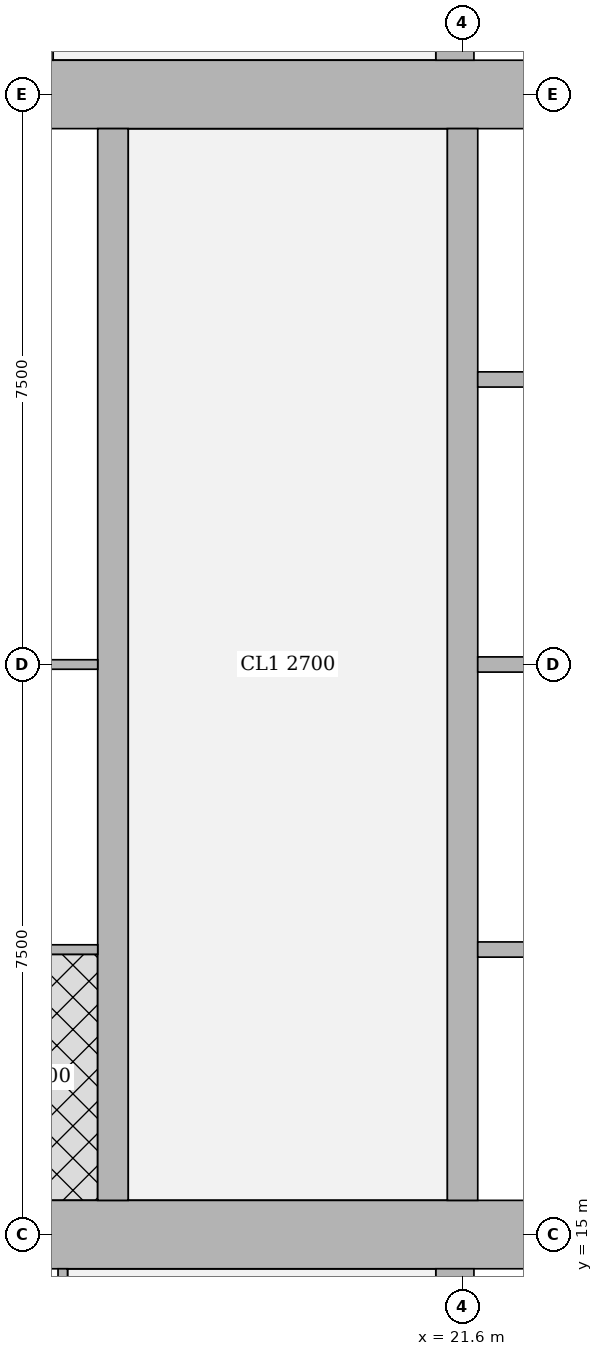
"""IFC4 building model, lengths in metres.
Left out: names, types, materials, properties, quantities, classifications, styles, units other than length and angle.
Written with IfcOpenShell. Run it as: python <this file> out.ifc"""

import sys

from ifc_helpers import new_model, si_unit, direction, frame, frame_2d, origin, place, context, subcontext, project, spatial, rectangle, extrude, element, fill, save


model = new_model("IFC4")
c1 = context("Model", 3, precision=1e-05, world=origin(), true_north=direction((0.0, 1.0)))
c2 = subcontext(c1, "Body", "Model", "MODEL_VIEW")
j1 = project(units=[si_unit("LENGTHUNIT", "METRE"), si_unit("PLANEANGLEUNIT", "RADIAN")], contexts=[c1])
p1 = place(None, origin())
s1 = spatial("IfcSite", under=j1, at=p1, CompositionType="ELEMENT")
p2 = place(p1, origin())
s2 = spatial("IfcBuilding", under=s1, at=p2, CompositionType="ELEMENT")
p3 = place(p2, frame((0.0, 0.0, 216.2)))
s3 = spatial("IfcBuildingStorey", under=s2, at=p3, CompositionType="ELEMENT", Elevation=216.2)
p4 = place(p3, frame((13.95, 15.0, 0.0), z_axis=(0.0, 0.0, 1.0), x_axis=(1.0, 0.0, 0.0)))
e1 = element("IfcWall", 1, at=p4, inside=s3, PredefinedType="SHEAR", context=c2, shape_type="SweptSolid", body=[
    extrude(rectangle(XDim=15.3, YDim=0.9, at=frame_2d((7.65, 0.0))), origin(), (0.0, 0.0, 1.0), 3.75),
])
p5 = place(p4, frame((4.45, 0.0, 0.0)))
e2 = element("IfcOpeningElement", 2, at=p5, cuts=e1, PredefinedType="OPENING", context=c2, shape_type="SweptSolid", body=[
    extrude(rectangle(XDim=1.8, YDim=2.1, at=frame_2d((0.9, 1.05))), frame((0.0, 0.46, 0.0), z_axis=(0.0, -1.0, 0.0), x_axis=(1.0, 0.0, 0.0)), (0.0, 0.0, 1.0), 0.92),
])
p6 = place(p4, frame((10.7, 0.0, 0.0)))
e3 = element("IfcOpeningElement", 3, at=p6, cuts=e1, PredefinedType="OPENING", context=c2, shape_type="SweptSolid", body=[
    extrude(rectangle(XDim=1.1, YDim=2.1, at=frame_2d((0.55, 1.05))), frame((0.0, 0.46, 0.0), z_axis=(0.0, -1.0, 0.0), x_axis=(1.0, 0.0, 0.0)), (0.0, 0.0, 1.0), 0.92),
])
p7 = place(p3, frame((13.95, 30.0, 0.0), z_axis=(0.0, 0.0, 1.0), x_axis=(1.0, 0.0, 0.0)))
e4 = element("IfcWall", 4, at=p7, inside=s3, PredefinedType="SHEAR", context=c2, shape_type="SweptSolid", body=[
    extrude(rectangle(XDim=15.3, YDim=0.9, at=frame_2d((7.65, 0.0))), origin(), (0.0, 0.0, 1.0), 3.75),
])
p8 = place(p7, frame((4.45, 0.0, 0.0)))
e5 = element("IfcOpeningElement", 5, at=p8, cuts=e4, PredefinedType="OPENING", context=c2, shape_type="SweptSolid", body=[
    extrude(rectangle(XDim=1.8, YDim=2.1, at=frame_2d((0.9, 1.05))), frame((0.0, 0.46, 0.0), z_axis=(0.0, -1.0, 0.0), x_axis=(1.0, 0.0, 0.0)), (0.0, 0.0, 1.0), 0.92),
])
p9 = place(p7, frame((10.7, 0.0, 0.0)))
e6 = element("IfcOpeningElement", 6, at=p9, cuts=e4, PredefinedType="OPENING", context=c2, shape_type="SweptSolid", body=[
    extrude(rectangle(XDim=1.1, YDim=2.1, at=frame_2d((0.55, 1.05))), frame((0.0, 0.46, 0.0), z_axis=(0.0, -1.0, 0.0), x_axis=(1.0, 0.0, 0.0)), (0.0, 0.0, 1.0), 0.92),
])
p10 = place(p3, frame((17.0, 15.45, 0.0), z_axis=(0.0, 0.0, 1.0), x_axis=(0.0, 1.0, 0.0)))
e7 = element("IfcWall", 7, at=p10, inside=s3, PredefinedType="SHEAR", context=c2, shape_type="SweptSolid", body=[
    extrude(rectangle(XDim=14.1, YDim=0.4, at=frame_2d((7.05, 0.0))), origin(), (0.0, 0.0, 1.0), 3.75),
])
p11 = place(p10, frame((0.925, 0.0, 0.0)))
e8 = element("IfcOpeningElement", 8, at=p11, cuts=e7, PredefinedType="OPENING", context=c2, shape_type="SweptSolid", body=[
    extrude(rectangle(XDim=1.0, YDim=2.1, at=frame_2d((0.5, 1.05))), frame((0.0, 0.21, 0.0), z_axis=(0.0, -1.0, 0.0), x_axis=(1.0, 0.0, 0.0)), (0.0, 0.0, 1.0), 0.42),
])
p12 = place(p10, frame((4.675, 0.0, 0.0)))
e9 = element("IfcOpeningElement", 9, at=p12, cuts=e7, PredefinedType="OPENING", context=c2, shape_type="SweptSolid", body=[
    extrude(rectangle(XDim=1.0, YDim=2.1, at=frame_2d((0.5, 1.05))), frame((0.0, 0.21, 0.0), z_axis=(0.0, -1.0, 0.0), x_axis=(1.0, 0.0, 0.0)), (0.0, 0.0, 1.0), 0.42),
])
p13 = place(p10, frame((8.425, 0.0, 0.0)))
e10 = element("IfcOpeningElement", 10, at=p13, cuts=e7, PredefinedType="OPENING", context=c2, shape_type="SweptSolid", body=[
    extrude(rectangle(XDim=1.0, YDim=2.1, at=frame_2d((0.5, 1.05))), frame((0.0, 0.21, 0.0), z_axis=(0.0, -1.0, 0.0), x_axis=(1.0, 0.0, 0.0)), (0.0, 0.0, 1.0), 0.42),
])
p14 = place(p10, frame((12.175, 0.0, 0.0)))
e11 = element("IfcOpeningElement", 11, at=p14, cuts=e7, PredefinedType="OPENING", context=c2, shape_type="SweptSolid", body=[
    extrude(rectangle(XDim=1.0, YDim=2.1, at=frame_2d((0.5, 1.05))), frame((0.0, 0.21, 0.0), z_axis=(0.0, -1.0, 0.0), x_axis=(1.0, 0.0, 0.0)), (0.0, 0.0, 1.0), 0.42),
])
p15 = place(p3, frame((21.6, 15.45, 0.0), z_axis=(0.0, 0.0, 1.0), x_axis=(0.0, 1.0, 0.0)))
e12 = element("IfcWall", 12, at=p15, inside=s3, PredefinedType="SHEAR", context=c2, shape_type="SweptSolid", body=[
    extrude(rectangle(XDim=14.1, YDim=0.4, at=frame_2d((7.05, 0.0))), origin(), (0.0, 0.0, 1.0), 3.75),
])
p16 = place(p15, frame((0.875, 0.0, 0.0)))
e13 = element("IfcOpeningElement", 13, at=p16, cuts=e12, PredefinedType="OPENING", context=c2, shape_type="SweptSolid", body=[
    extrude(rectangle(XDim=1.1, YDim=2.1, at=frame_2d((0.55, 1.05))), frame((0.0, 0.21, 0.0), z_axis=(0.0, -1.0, 0.0), x_axis=(1.0, 0.0, 0.0)), (0.0, 0.0, 1.0), 0.42),
])
p17 = place(p15, frame((4.625, 0.0, 0.0)))
e14 = element("IfcOpeningElement", 14, at=p17, cuts=e12, PredefinedType="OPENING", context=c2, shape_type="SweptSolid", body=[
    extrude(rectangle(XDim=1.1, YDim=2.1, at=frame_2d((0.55, 1.05))), frame((0.0, 0.21, 0.0), z_axis=(0.0, -1.0, 0.0), x_axis=(1.0, 0.0, 0.0)), (0.0, 0.0, 1.0), 0.42),
])
p18 = place(p15, frame((8.375, 0.0, 0.0)))
e15 = element("IfcOpeningElement", 15, at=p18, cuts=e12, PredefinedType="OPENING", context=c2, shape_type="SweptSolid", body=[
    extrude(rectangle(XDim=1.1, YDim=2.1, at=frame_2d((0.55, 1.05))), frame((0.0, 0.21, 0.0), z_axis=(0.0, -1.0, 0.0), x_axis=(1.0, 0.0, 0.0)), (0.0, 0.0, 1.0), 0.42),
])
p19 = place(p15, frame((12.125, 0.0, 0.0)))
e16 = element("IfcOpeningElement", 16, at=p19, cuts=e12, PredefinedType="OPENING", context=c2, shape_type="SweptSolid", body=[
    extrude(rectangle(XDim=1.1, YDim=2.1, at=frame_2d((0.55, 1.05))), frame((0.0, 0.21, 0.0), z_axis=(0.0, -1.0, 0.0), x_axis=(1.0, 0.0, 0.0)), (0.0, 0.0, 1.0), 0.42),
])
for number, where, z_axis, x_axis in (
    (17, (21.5, 10.35, 0.0), (0.0, 0.0, 1.0), (0.0, 1.0, 0.0)),
    (18, (21.5, 30.45, 0.0), (0.0, 0.0, 1.0), (0.0, 1.0, 0.0)),
):
    element("IfcWall", number, at=place(p3, frame(where, z_axis=z_axis, x_axis=x_axis)), inside=s3, PredefinedType="SHEAR", context=c2, shape_type="SweptSolid", body=[
        extrude(rectangle(XDim=4.2, YDim=0.5, at=frame_2d((2.1, 0.0))), origin(), (0.0, 0.0, 1.0), 3.75),
    ])
p20 = place(p3, frame((16.34, 10.163, 0.0), z_axis=(0.0, 0.0, 1.0), x_axis=(0.0, 1.0, 0.0)))
e19 = element("IfcWall", 19, at=p20, inside=s3, PredefinedType="PARTITIONING", context=c2, shape_type="SweptSolid", body=[
    extrude(rectangle(XDim=4.387, YDim=0.125, at=frame_2d((2.193, 0.0))), origin(), (0.0, 0.0, 1.0), 3.5),
])
p21 = place(p20, frame((1.637, 0.0, 0.0)))
e20 = element("IfcOpeningElement", 20, at=p21, cuts=e19, PredefinedType="OPENING", context=c2, shape_type="SweptSolid", body=[
    extrude(rectangle(XDim=1.0, YDim=2.1, at=frame_2d((0.5, 1.05))), frame((0.0, 0.073, 0.0), z_axis=(0.0, -1.0, 0.0), x_axis=(1.0, 0.0, 0.0)), (0.0, 0.0, 1.0), 0.145),
])
p22 = place(p3, frame((16.15, 30.45, 0.0), z_axis=(0.0, 0.0, 1.0), x_axis=(0.0, 1.0, 0.0)))
e21 = element("IfcWall", 21, at=p22, inside=s3, PredefinedType="PARTITIONING", context=c2, shape_type="SweptSolid", body=[
    extrude(rectangle(XDim=4.387, YDim=0.125, at=frame_2d((2.193, 0.0))), origin(), (0.0, 0.0, 1.0), 3.5),
])
p23 = place(p22, frame((1.75, 0.0, 0.0)))
e22 = element("IfcOpeningElement", 22, at=p23, cuts=e21, PredefinedType="OPENING", context=c2, shape_type="SweptSolid", body=[
    extrude(rectangle(XDim=1.0, YDim=2.1, at=frame_2d((0.5, 1.05))), frame((0.0, 0.073, 0.0), z_axis=(0.0, -1.0, 0.0), x_axis=(1.0, 0.0, 0.0)), (0.0, 0.0, 1.0), 0.145),
])
for number, where, z_axis, x_axis in (
    (23, (14.85, 18.75, 0.0), (0.0, 0.0, 1.0), (1.0, 0.0, 0.0)),
    (24, (14.85, 22.5, 0.0), (0.0, 0.0, 1.0), (1.0, 0.0, 0.0)),
):
    element("IfcWall", number, at=place(p3, frame(where, z_axis=z_axis, x_axis=x_axis)), inside=s3, PredefinedType="PARTITIONING", context=c2, shape_type="SweptSolid", body=[
        extrude(rectangle(XDim=1.95, YDim=0.125, at=frame_2d((0.975, 0.0))), origin(), (0.0, 0.0, 1.0), 3.5),
    ])
for number, where, z_axis, x_axis in (
    (25, (21.8, 18.75, 0.0), (0.0, 0.0, 1.0), (1.0, 0.0, 0.0)),
    (26, (21.8, 22.5, 0.0), (0.0, 0.0, 1.0), (1.0, 0.0, 0.0)),
    (27, (21.8, 26.25, 0.0), (0.0, 0.0, 1.0), (1.0, 0.0, 0.0)),
):
    element("IfcWall", number, at=place(p3, frame(where, z_axis=z_axis, x_axis=x_axis)), inside=s3, PredefinedType="SOLIDWALL", context=c2, shape_type="SweptSolid", body=[
        extrude(rectangle(XDim=2.2, YDim=0.2, at=frame_2d((1.1, 0.0))), origin(), (0.0, 0.0, 1.0), 3.5),
    ])
p24 = place(p11, origin())
e28 = element("IfcDoor", 28, at=p24, inside=s3, OperationType="SINGLE_SWING_LEFT", PredefinedType="DOOR", context=c2, shape_type="SweptSolid", body=[
    extrude(rectangle(XDim=1.0, YDim=2.1, at=frame_2d((0.5, 1.05))), frame((0.0, 0.025, 0.0), z_axis=(0.0, -1.0, 0.0), x_axis=(1.0, 0.0, 0.0)), (0.0, 0.0, 1.0), 0.05),
])
fill(e8, e28)
p25 = place(p12, origin())
e29 = element("IfcDoor", 29, at=p25, inside=s3, OperationType="SINGLE_SWING_LEFT", PredefinedType="DOOR", context=c2, shape_type="SweptSolid", body=[
    extrude(rectangle(XDim=1.0, YDim=2.1, at=frame_2d((0.5, 1.05))), frame((0.0, 0.025, 0.0), z_axis=(0.0, -1.0, 0.0), x_axis=(1.0, 0.0, 0.0)), (0.0, 0.0, 1.0), 0.05),
])
fill(e9, e29)
p26 = place(p13, origin())
e30 = element("IfcDoor", 30, at=p26, inside=s3, OperationType="SINGLE_SWING_LEFT", PredefinedType="DOOR", context=c2, shape_type="SweptSolid", body=[
    extrude(rectangle(XDim=1.0, YDim=2.1, at=frame_2d((0.5, 1.05))), frame((0.0, 0.025, 0.0), z_axis=(0.0, -1.0, 0.0), x_axis=(1.0, 0.0, 0.0)), (0.0, 0.0, 1.0), 0.05),
])
fill(e10, e30)
p27 = place(p14, origin())
e31 = element("IfcDoor", 31, at=p27, inside=s3, OperationType="SINGLE_SWING_RIGHT", PredefinedType="DOOR", context=c2, shape_type="SweptSolid", body=[
    extrude(rectangle(XDim=1.0, YDim=2.1, at=frame_2d((0.5, 1.05))), frame((0.0, 0.025, 0.0), z_axis=(0.0, -1.0, 0.0), x_axis=(1.0, 0.0, 0.0)), (0.0, 0.0, 1.0), 0.05),
])
fill(e11, e31)
p28 = place(p5, origin())
e32 = element("IfcDoor", 32, at=p28, inside=s3, OperationType="DOUBLE_DOOR_SINGLE_SWING", PredefinedType="DOOR", context=c2, shape_type="SweptSolid", body=[
    extrude(rectangle(XDim=1.8, YDim=2.1, at=frame_2d((0.9, 1.05))), frame((0.0, 0.025, 0.0), z_axis=(0.0, -1.0, 0.0), x_axis=(1.0, 0.0, 0.0)), (0.0, 0.0, 1.0), 0.05),
])
fill(e2, e32)
p29 = place(p8, origin())
e33 = element("IfcDoor", 33, at=p29, inside=s3, OperationType="DOUBLE_DOOR_SINGLE_SWING", PredefinedType="DOOR", context=c2, shape_type="SweptSolid", body=[
    extrude(rectangle(XDim=1.8, YDim=2.1, at=frame_2d((0.9, 1.05))), frame((0.0, 0.025, 0.0), z_axis=(0.0, -1.0, 0.0), x_axis=(1.0, 0.0, 0.0)), (0.0, 0.0, 1.0), 0.05),
])
fill(e5, e33)
p30 = place(p16, origin())
e34 = element("IfcDoor", 34, at=p30, inside=s3, OperationType="DOUBLE_DOOR_SLIDING", PredefinedType="DOOR", context=c2, shape_type="SweptSolid", body=[
    extrude(rectangle(XDim=1.1, YDim=2.1, at=frame_2d((0.55, 1.05))), frame((0.0, 0.025, 0.0), z_axis=(0.0, -1.0, 0.0), x_axis=(1.0, 0.0, 0.0)), (0.0, 0.0, 1.0), 0.05),
])
fill(e13, e34)
p31 = place(p17, origin())
e35 = element("IfcDoor", 35, at=p31, inside=s3, OperationType="DOUBLE_DOOR_SLIDING", PredefinedType="DOOR", context=c2, shape_type="SweptSolid", body=[
    extrude(rectangle(XDim=1.1, YDim=2.1, at=frame_2d((0.55, 1.05))), frame((0.0, 0.025, 0.0), z_axis=(0.0, -1.0, 0.0), x_axis=(1.0, 0.0, 0.0)), (0.0, 0.0, 1.0), 0.05),
])
fill(e14, e35)
p32 = place(p18, origin())
e36 = element("IfcDoor", 36, at=p32, inside=s3, OperationType="DOUBLE_DOOR_SLIDING", PredefinedType="DOOR", context=c2, shape_type="SweptSolid", body=[
    extrude(rectangle(XDim=1.1, YDim=2.1, at=frame_2d((0.55, 1.05))), frame((0.0, 0.025, 0.0), z_axis=(0.0, -1.0, 0.0), x_axis=(1.0, 0.0, 0.0)), (0.0, 0.0, 1.0), 0.05),
])
fill(e15, e36)
p33 = place(p19, origin())
e37 = element("IfcDoor", 37, at=p33, inside=s3, OperationType="DOUBLE_DOOR_SLIDING", PredefinedType="DOOR", context=c2, shape_type="SweptSolid", body=[
    extrude(rectangle(XDim=1.1, YDim=2.1, at=frame_2d((0.55, 1.05))), frame((0.0, 0.025, 0.0), z_axis=(0.0, -1.0, 0.0), x_axis=(1.0, 0.0, 0.0)), (0.0, 0.0, 1.0), 0.05),
])
fill(e16, e37)
save(model, sys.argv[1])
